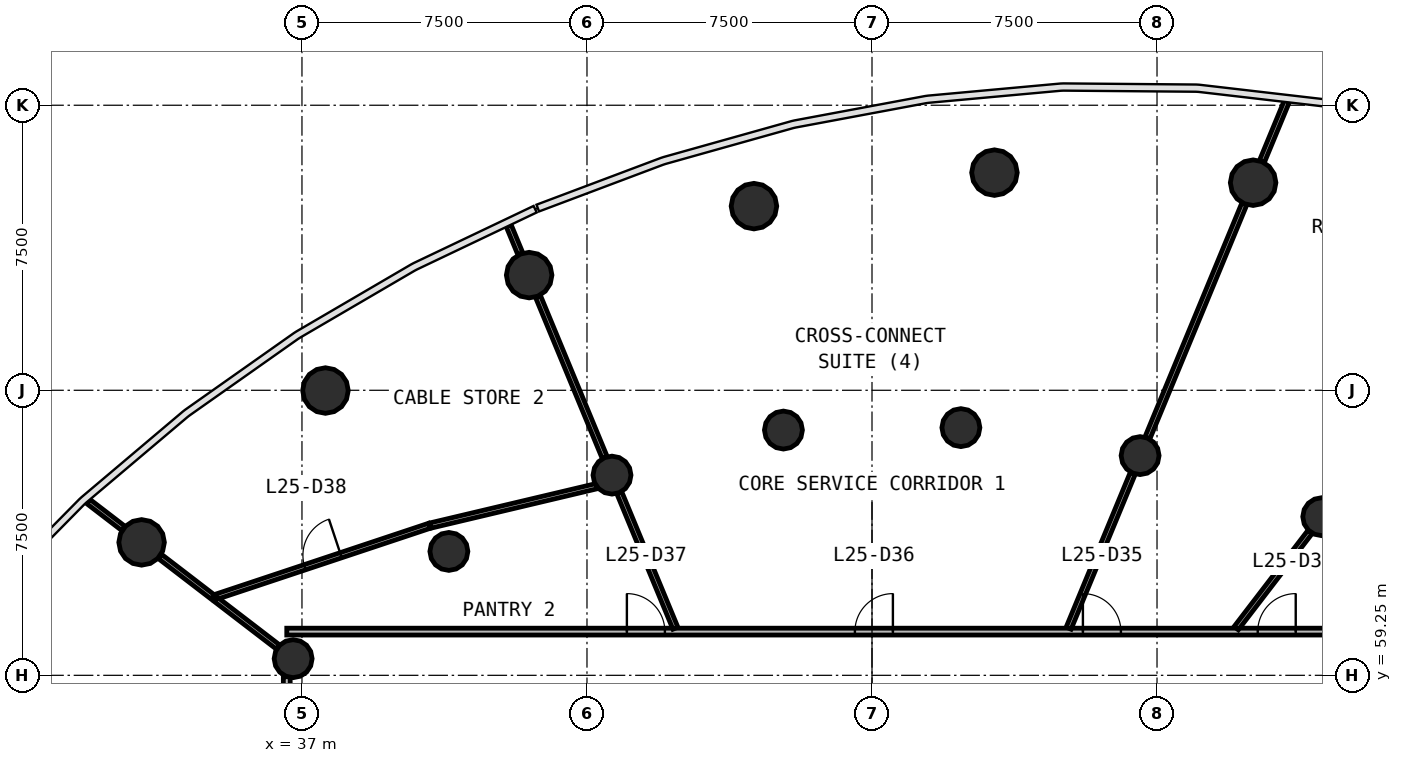
"""IFC4 building model, lengths in metres.
Left out: names, types, materials, properties, quantities, classifications, styles, units other than length and angle.
Written with IfcOpenShell. Run it as: python <this file> out.ifc"""

import sys

from ifc_helpers import new_model, si_unit, direction, frame, frame_2d, origin, origin_2d, place, context, subcontext, project, spatial, rectangle, circle, extrude, source, transform, mapped, element, fill, save


model = new_model("IFC4")
c1 = context("Model", 3, precision=1e-05, world=origin(), true_north=direction((0.0, 1.0)))
c2 = subcontext(c1, "Body", "Model", "MODEL_VIEW")
j1 = project(units=[si_unit("LENGTHUNIT", "METRE"), si_unit("PLANEANGLEUNIT", "RADIAN")], contexts=[c1])
p1 = place(None, origin())
s1 = spatial("IfcSite", under=j1, at=p1, CompositionType="ELEMENT")
p2 = place(p1, origin())
s2 = spatial("IfcBuilding", under=s1, at=p2, CompositionType="ELEMENT")
p3 = place(p2, frame((0.0, 0.0, 108.5)))
s3 = spatial("IfcBuildingStorey", under=s2, at=p3, CompositionType="ELEMENT", Elevation=108.5)
m1 = source(origin(), c2, "Body", "SweptSolid", [
    extrude(circle(Radius=0.6, at=origin_2d()), origin(), (0.0, 0.0, 1.0), 4.1),
])
for number, where, z_axis, x_axis in (
    (1, (62.029, 72.212, 0.0), (0.0, 0.0, 1.0), (1.0, 0.0, 0.0)),
    (2, (55.222, 72.477, 0.0), (0.0, 0.0, 1.0), (1.0, 0.0, 0.0)),
    (3, (48.894, 71.595, 0.0), (0.0, 0.0, 1.0), (1.0, 0.0, 0.0)),
    (4, (42.978, 69.781, 0.0), (0.0, 0.0, 1.0), (1.0, 0.0, 0.0)),
    (5, (37.618, 66.743, 0.0), (0.0, 0.0, 1.0), (1.0, 0.0, 0.0)),
    (6, (32.78, 62.748, 0.0), (0.0, 0.0, 1.0), (1.0, 0.0, 0.0)),
):
    element("IfcColumn", number, at=place(p3, frame(where, z_axis=z_axis, x_axis=x_axis)), inside=s3, PredefinedType="COLUMN", context=c2, shape_type="MappedRepresentation", body=[
        mapped(m1, transform((0.0, 0.0, 0.0), scale=1.0)),
    ])
m2 = source(origin(), c2, "Body", "SweptSolid", [
    extrude(circle(Radius=0.5, at=origin_2d()), origin(), (0.0, 0.0, 1.0), 4.1),
])
for number, where, z_axis, x_axis in (
    (7, (63.835, 63.424, 0.0), (0.0, 0.0, 1.0), (1.0, 0.0, 0.0)),
    (8, (59.055, 65.031, 0.0), (0.0, 0.0, 1.0), (1.0, 0.0, 0.0)),
    (9, (54.339, 65.767, 0.0), (0.0, 0.0, 1.0), (1.0, 0.0, 0.0)),
    (10, (49.669, 65.703, 0.0), (0.0, 0.0, 1.0), (1.0, 0.0, 0.0)),
    (11, (45.158, 64.518, 0.0), (0.0, 0.0, 1.0), (1.0, 0.0, 0.0)),
    (12, (40.866, 62.51, 0.0), (0.0, 0.0, 1.0), (1.0, 0.0, 0.0)),
    (13, (36.768, 59.688, 0.0), (0.0, 0.0, 1.0), (1.0, 0.0, 0.0)),
):
    element("IfcColumn", number, at=place(p3, frame(where, z_axis=z_axis, x_axis=x_axis)), inside=s3, PredefinedType="COLUMN", context=c2, shape_type="MappedRepresentation", body=[
        mapped(m2, transform((0.0, 0.0, 0.0), scale=1.0)),
    ])
p4 = place(p3, frame((36.6, 60.4, 0.0), z_axis=(0.0, 0.0, 1.0), x_axis=(1.0, 0.0, 0.0)))
e14 = element("IfcWall", 14, at=p4, inside=s3, PredefinedType="PARTITIONING", context=c2, shape_type="SweptSolid", body=[
    extrude(rectangle(XDim=30.8, YDim=0.18, at=frame_2d((15.4, 0.0))), origin(), (0.0, 0.0, 1.0), 2.9),
])
p5 = place(p4, frame((25.55, 0.0, 0.0)))
e15 = element("IfcOpeningElement", 15, at=p5, cuts=e14, PredefinedType="OPENING", context=c2, shape_type="SweptSolid", body=[
    extrude(rectangle(XDim=1.0, YDim=2.1, at=frame_2d((0.5, 1.05))), frame((0.0, 0.1, 0.0), z_axis=(0.0, -1.0, 0.0), x_axis=(1.0, 0.0, 0.0)), (0.0, 0.0, 1.0), 0.2),
])
p6 = place(p4, frame((20.95, 0.0, 0.0)))
e16 = element("IfcOpeningElement", 16, at=p6, cuts=e14, PredefinedType="OPENING", context=c2, shape_type="SweptSolid", body=[
    extrude(rectangle(XDim=1.0, YDim=2.1, at=frame_2d((0.5, 1.05))), frame((0.0, 0.1, 0.0), z_axis=(0.0, -1.0, 0.0), x_axis=(1.0, 0.0, 0.0)), (0.0, 0.0, 1.0), 0.2),
])
p7 = place(p4, frame((14.95, 0.0, 0.0)))
e17 = element("IfcOpeningElement", 17, at=p7, cuts=e14, PredefinedType="OPENING", context=c2, shape_type="SweptSolid", body=[
    extrude(rectangle(XDim=1.0, YDim=2.1, at=frame_2d((0.5, 1.05))), frame((0.0, 0.1, 0.0), z_axis=(0.0, -1.0, 0.0), x_axis=(1.0, 0.0, 0.0)), (0.0, 0.0, 1.0), 0.2),
])
p8 = place(p4, frame((8.95, 0.0, 0.0)))
e18 = element("IfcOpeningElement", 18, at=p8, cuts=e14, PredefinedType="OPENING", context=c2, shape_type="SweptSolid", body=[
    extrude(rectangle(XDim=1.0, YDim=2.1, at=frame_2d((0.5, 1.05))), frame((0.0, 0.1, 0.0), z_axis=(0.0, -1.0, 0.0), x_axis=(1.0, 0.0, 0.0)), (0.0, 0.0, 1.0), 0.2),
])
p9 = place(p3, frame((36.6, 35.63, 0.0), z_axis=(0.0, 0.0, 1.0), x_axis=(0.0, 1.0, 0.0)))
e19 = element("IfcWall", 19, at=p9, inside=s3, PredefinedType="PARTITIONING", context=c2, shape_type="SweptSolid", body=[
    extrude(rectangle(XDim=23.583, YDim=0.18, at=frame_2d((11.791, 0.0))), origin(), (0.0, 0.0, 1.0), 2.9),
])
p10 = place(p9, frame((11.333, 0.0, 0.0)))
e20 = element("IfcOpeningElement", 20, at=p10, cuts=e19, PredefinedType="OPENING", context=c2, shape_type="SweptSolid", body=[
    extrude(rectangle(XDim=1.0, YDim=2.1, at=frame_2d((0.5, 1.05))), frame((0.0, 0.1, 0.0), z_axis=(0.0, -1.0, 0.0), x_axis=(1.0, 0.0, 0.0)), (0.0, 0.0, 1.0), 0.2),
])
p11 = place(p9, frame((9.133, 0.0, 0.0)))
e21 = element("IfcOpeningElement", 21, at=p11, cuts=e19, PredefinedType="OPENING", context=c2, shape_type="SweptSolid", body=[
    extrude(rectangle(XDim=1.0, YDim=2.1, at=frame_2d((0.5, 1.05))), frame((0.0, 0.1, 0.0), z_axis=(0.0, -1.0, 0.0), x_axis=(1.0, 0.0, 0.0)), (0.0, 0.0, 1.0), 0.2),
])
p12 = place(p3, frame((59.248, 65.498, 0.0), z_axis=(0.0, 0.0, 1.0), x_axis=(0.382696989205, 0.923873916968, 0.0)))
e22 = element("IfcWall", 22, at=p12, inside=s3, PredefinedType="PARTITIONING", context=c2, shape_type="SweptSolid", body=[
    extrude(rectangle(XDim=6.663, YDim=0.14, at=frame_2d((3.332, 0.0))), origin(), (0.0, 0.0, 1.0), 2.9),
])
p13 = place(p3, frame((34.675, 61.294, 0.0), z_axis=(0.0, 0.0, 1.0), x_axis=(0.948817917671, 0.315823620247, 0.0)))
e23 = element("IfcWall", 23, at=p13, inside=s3, PredefinedType="PARTITIONING", context=c2, shape_type="SweptSolid", body=[
    extrude(rectangle(XDim=5.981, YDim=0.14, at=frame_2d((2.99, 0.0))), origin(), (0.0, 0.0, 1.0), 2.9),
])
p14 = place(p13, frame((2.531, 0.0, 0.0)))
e24 = element("IfcOpeningElement", 24, at=p14, cuts=e23, PredefinedType="OPENING", context=c2, shape_type="SweptSolid", body=[
    extrude(rectangle(XDim=1.0, YDim=2.1, at=frame_2d((0.5, 1.05))), frame((0.0, 0.08, 0.0), z_axis=(0.0, -1.0, 0.0), x_axis=(1.0, 0.0, 0.0)), (0.0, 0.0, 1.0), 0.16),
])
p15 = place(p3, frame((44.965, 64.984, 0.0), z_axis=(0.0, 0.0, 1.0), x_axis=(-0.382705930348, 0.923870213221, 0.0)))
e25 = element("IfcWall", 25, at=p15, inside=s3, PredefinedType="PARTITIONING", context=c2, shape_type="SweptSolid", body=[
    extrude(rectangle(XDim=4.587, YDim=0.14, at=frame_2d((2.293, 0.0))), origin(), (0.0, 0.0, 1.0), 2.9),
])
p16 = place(p3, frame((44.747, 64.226, 0.0), z_axis=(0.0, 0.0, 1.0), x_axis=(-0.973038547424, -0.230642548604, 0.0)))
e26 = element("IfcWall", 26, at=p16, inside=s3, PredefinedType="PARTITIONING", context=c2, shape_type="SweptSolid", body=[
    extrude(rectangle(XDim=4.489, YDim=0.14, at=frame_2d((2.245, 0.0))), origin(), (0.0, 0.0, 1.0), 2.9),
])
p17 = place(p3, frame((57.174, 60.49, 0.0), z_axis=(0.0, 0.0, 1.0), x_axis=(0.382672831764, 0.923883923353, 0.0)))
e27 = element("IfcWall", 27, at=p17, inside=s3, PredefinedType="PARTITIONING", context=c2, shape_type="SweptSolid", body=[
    extrude(rectangle(XDim=4.41, YDim=0.14, at=frame_2d((2.205, 0.0))), origin(), (0.0, 0.0, 1.0), 2.9),
])
p18 = place(p3, frame((46.826, 60.49, 0.0), z_axis=(0.0, 0.0, 1.0), x_axis=(-0.382644558062, 0.923895633817, 0.0)))
e28 = element("IfcWall", 28, at=p18, inside=s3, PredefinedType="PARTITIONING", context=c2, shape_type="SweptSolid", body=[
    extrude(rectangle(XDim=3.854, YDim=0.14, at=frame_2d((1.927, 0.0))), origin(), (0.0, 0.0, 1.0), 2.9),
])
p19 = place(p3, frame((61.584, 60.49, 0.0), z_axis=(0.0, 0.0, 1.0), x_axis=(0.60874605662, 0.793365135703, 0.0)))
e29 = element("IfcWall", 29, at=p19, inside=s3, PredefinedType="PARTITIONING", context=c2, shape_type="SweptSolid", body=[
    extrude(rectangle(XDim=3.194, YDim=0.14, at=frame_2d((1.597, 0.0))), origin(), (0.0, 0.0, 1.0), 2.9),
])
p20 = place(p3, frame((36.367, 59.995, 0.0), z_axis=(0.0, 0.0, 1.0), x_axis=(-0.793389614633, 0.608714152449, 0.0)))
e30 = element("IfcWall", 30, at=p20, inside=s3, PredefinedType="PARTITIONING", context=c2, shape_type="SweptSolid", body=[
    extrude(rectangle(XDim=2.049, YDim=0.14, at=frame_2d((1.024, 0.0))), origin(), (0.0, 0.0, 1.0), 2.9),
])
p21 = place(p3, frame((34.651, 61.312, 0.0), z_axis=(0.0, 0.0, 1.0), x_axis=(-0.793368751306, 0.608741344456, 0.0)))
e31 = element("IfcWall", 31, at=p21, inside=s3, PredefinedType="PARTITIONING", context=c2, shape_type="SweptSolid", body=[
    extrude(rectangle(XDim=1.753, YDim=0.14, at=frame_2d((0.877, 0.0))), origin(), (0.0, 0.0, 1.0), 2.9),
])
p22 = place(p3, frame((62.26, 72.771, 0.0), z_axis=(0.0, 0.0, 1.0), x_axis=(0.382769756697, 0.923843771077, 0.0)))
e32 = element("IfcWall", 32, at=p22, inside=s3, PredefinedType="PARTITIONING", context=c2, shape_type="SweptSolid", body=[
    extrude(rectangle(XDim=1.719, YDim=0.14, at=frame_2d((0.86, 0.0))), origin(), (0.0, 0.0, 1.0), 2.9),
])
p23 = place(p3, frame((32.301, 63.116, 0.0), z_axis=(0.0, 0.0, 1.0), x_axis=(-0.793332880396, 0.608788091935, 0.0)))
e33 = element("IfcWall", 33, at=p23, inside=s3, PredefinedType="PARTITIONING", context=c2, shape_type="SweptSolid", body=[
    extrude(rectangle(XDim=1.164, YDim=0.14, at=frame_2d((0.582, 0.0))), origin(), (0.0, 0.0, 1.0), 2.9),
])
p24 = place(p3, frame((42.747, 70.34, 0.0), z_axis=(0.0, 0.0, 1.0), x_axis=(-0.382520140646, 0.923947153251, 0.0)))
e34 = element("IfcWall", 34, at=p24, inside=s3, PredefinedType="PARTITIONING", context=c2, shape_type="SweptSolid", body=[
    extrude(rectangle(XDim=0.811, YDim=0.14, at=frame_2d((0.406, 0.0))), origin(), (0.0, 0.0, 1.0), 2.9),
])
m3 = source(origin(), c2, "Body", "SweptSolid", [
    extrude(rectangle(XDim=1.0, YDim=2.1, at=frame_2d((0.5, 1.05))), frame((0.0, 0.025, 0.0), z_axis=(0.0, -1.0, 0.0), x_axis=(1.0, 0.0, 0.0)), (0.0, 0.0, 1.0), 0.05),
])
p25 = place(p5, origin())
e35 = element("IfcDoor", 35, at=p25, inside=s3, OperationType="SINGLE_SWING_RIGHT", PredefinedType="DOOR", context=c2, shape_type="MappedRepresentation", body=[
    mapped(m3, transform((0.0, 0.0, 0.0), scale=1.0)),
])
fill(e15, e35)
p26 = place(p6, origin())
e36 = element("IfcDoor", 36, at=p26, inside=s3, OperationType="SINGLE_SWING_LEFT", PredefinedType="DOOR", context=c2, shape_type="MappedRepresentation", body=[
    mapped(m3, transform((0.0, 0.0, 0.0), scale=1.0)),
])
fill(e16, e36)
p27 = place(p7, origin())
e37 = element("IfcDoor", 37, at=p27, inside=s3, OperationType="SINGLE_SWING_RIGHT", PredefinedType="DOOR", context=c2, shape_type="MappedRepresentation", body=[
    mapped(m3, transform((0.0, 0.0, 0.0), scale=1.0)),
])
fill(e17, e37)
p28 = place(p8, origin())
e38 = element("IfcDoor", 38, at=p28, inside=s3, OperationType="SINGLE_SWING_LEFT", PredefinedType="DOOR", context=c2, shape_type="MappedRepresentation", body=[
    mapped(m3, transform((0.0, 0.0, 0.0), scale=1.0)),
])
fill(e18, e38)
p29 = place(p14, origin())
e39 = element("IfcDoor", 39, at=p29, inside=s3, OperationType="SINGLE_SWING_RIGHT", PredefinedType="DOOR", context=c2, shape_type="MappedRepresentation", body=[
    mapped(m3, transform((0.0, 0.0, 0.0), scale=1.0)),
])
fill(e24, e39)
save(model, sys.argv[1])
